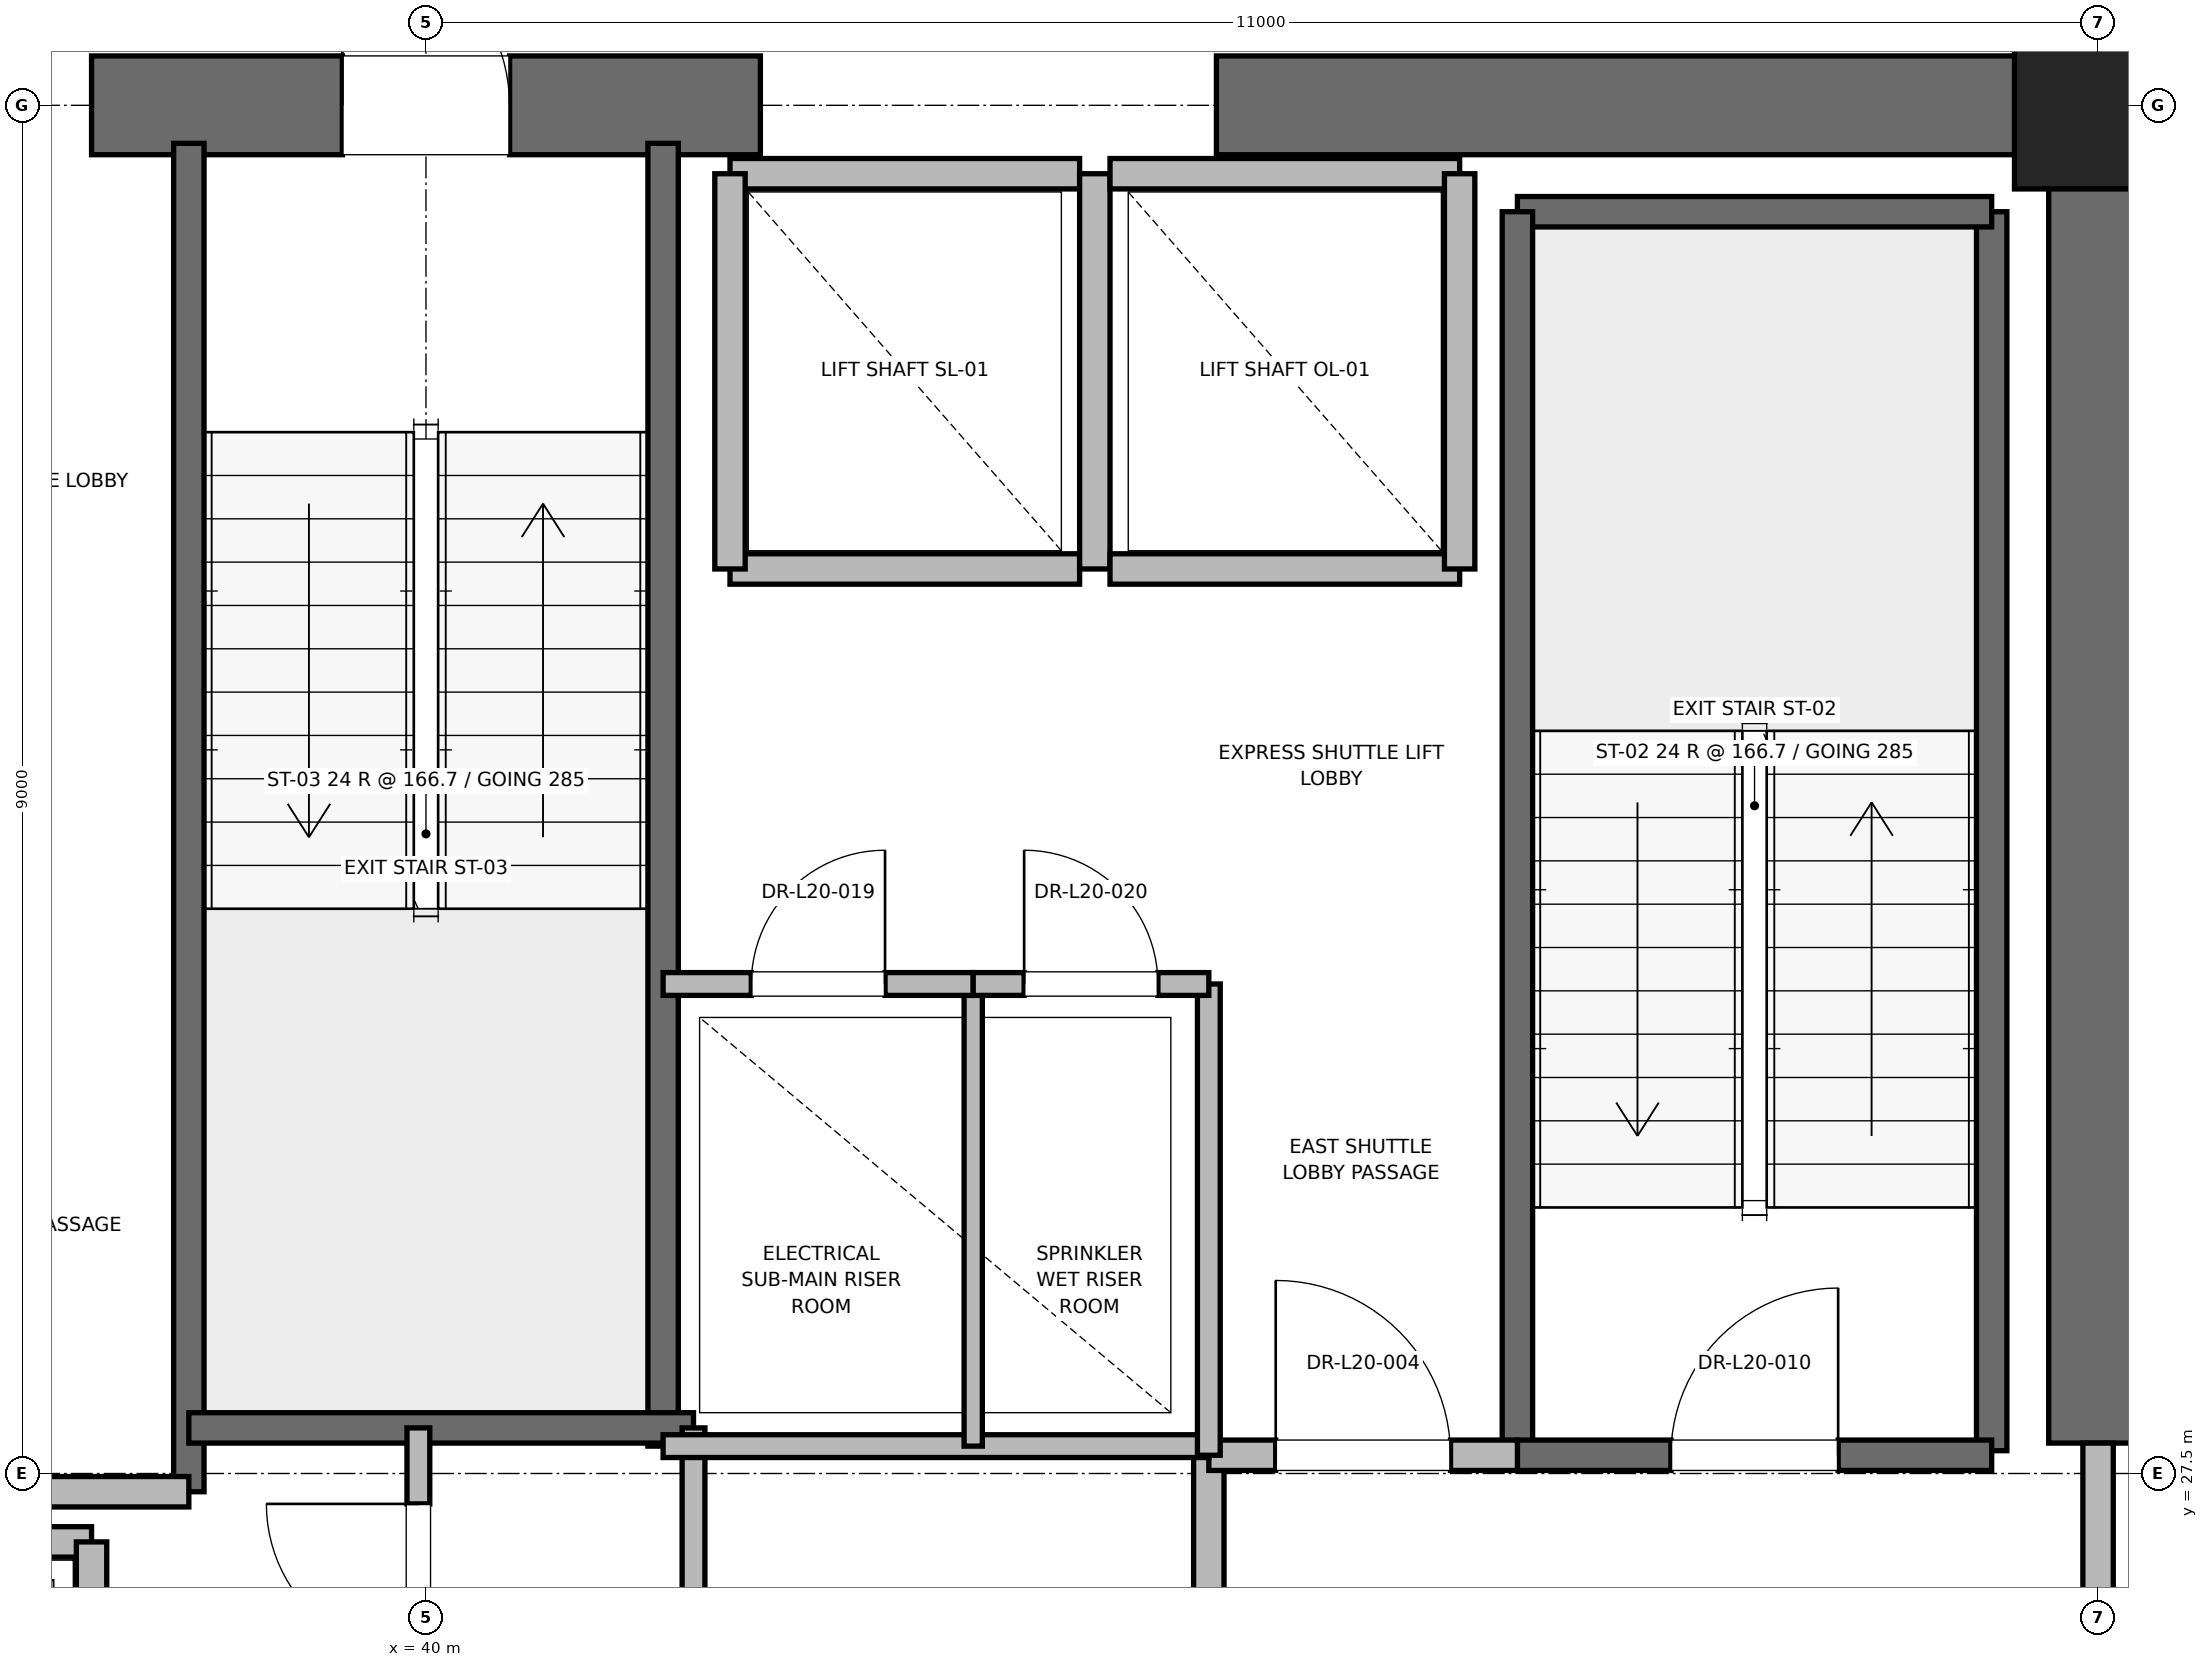
"""IFC4 building model, lengths in metres.
Left out: names, types, materials, properties, quantities, classifications, styles, units other than length and angle.
Written with IfcOpenShell. Run it as: python <this file> out.ifc"""

import sys

from ifc_helpers import new_model, si_unit, direction, frame, frame_2d, origin, origin_2d, place, context, subcontext, project, spatial, rectangle, extrude, element, fill, save


model = new_model("IFC4")
c1 = context("Model", 3, precision=1e-05, world=origin(), true_north=direction((0.0, 1.0)))
c2 = subcontext(c1, "Body", "Model", "MODEL_VIEW")
j1 = project(units=[si_unit("LENGTHUNIT", "METRE"), si_unit("PLANEANGLEUNIT", "RADIAN")], contexts=[c1])
p1 = place(None, origin())
s1 = spatial("IfcSite", under=j1, at=p1, CompositionType="ELEMENT")
p2 = place(p1, origin())
s2 = spatial("IfcBuilding", under=s1, at=p2, CompositionType="ELEMENT")
p3 = place(p2, frame((0.0, 0.0, 87.6)))
s3 = spatial("IfcBuildingStorey", under=s2, at=p3, CompositionType="ELEMENT", Elevation=87.6)
p4 = place(p3, frame((51.0, 36.5, 0.0), z_axis=(0.0, 0.0, 1.0), x_axis=(1.0, 0.0, 0.0)))
e1 = element("IfcColumn", 1, at=p4, inside=s3, PredefinedType="PILASTER", context=c2, shape_type="SweptSolid", body=[
    extrude(rectangle(XDim=1.1, YDim=1.1, at=origin_2d()), origin(), (0.0, 0.0, 1.0), 4.0),
])
p5 = place(p3, frame((37.8, 36.5, 0.0), z_axis=(0.0, 0.0, 1.0), x_axis=(1.0, 0.0, 0.0)))
e2 = element("IfcWall", 2, at=p5, inside=s3, PredefinedType="SHEAR", context=c2, shape_type="SweptSolid", body=[
    extrude(rectangle(XDim=4.4, YDim=0.65, at=frame_2d((2.2, 0.0))), origin(), (0.0, 0.0, 1.0), 3.76),
])
p6 = place(p5, frame((1.65, 0.0, 0.0)))
e3 = element("IfcOpeningElement", 3, at=p6, cuts=e2, PredefinedType="OPENING", context=c2, shape_type="SweptSolid", body=[
    extrude(rectangle(XDim=1.1, YDim=2.15, at=frame_2d((0.55, 1.075))), frame((0.0, 0.325, 0.0), z_axis=(0.0, -1.0, 0.0), x_axis=(1.0, 0.0, 0.0)), (0.0, 0.0, 1.0), 0.65),
])
p7 = place(p3, frame((45.2, 36.5, 0.0), z_axis=(0.0, 0.0, 1.0), x_axis=(1.0, 0.0, 0.0)))
e4 = element("IfcWall", 4, at=p7, inside=s3, PredefinedType="SHEAR", context=c2, shape_type="SweptSolid", body=[
    extrude(rectangle(XDim=5.8, YDim=0.65, at=frame_2d((2.9, 0.0))), origin(), (0.0, 0.0, 1.0), 3.76),
])
p8 = place(p3, frame((51.0, 27.7, 0.0), z_axis=(0.0, 0.0, 1.0), x_axis=(0.0, 1.0, 0.0)))
e5 = element("IfcWall", 5, at=p8, inside=s3, PredefinedType="SHEAR", context=c2, shape_type="SweptSolid", body=[
    extrude(rectangle(XDim=8.8, YDim=0.65, at=frame_2d((4.4, 0.0))), origin(), (0.0, 0.0, 1.0), 3.76),
])
p9 = place(p3, frame((50.3, 27.65, 0.0), z_axis=(0.0, 0.0, 1.0), x_axis=(0.0, 1.0, 0.0)))
e6 = element("IfcWall", 6, at=p9, inside=s3, PredefinedType="SOLIDWALL", context=c2, shape_type="SweptSolid", body=[
    extrude(rectangle(XDim=8.15, YDim=0.2, at=frame_2d((4.075, 0.0))), origin(), (0.0, 0.0, 1.0), 3.76),
])
p10 = place(p3, frame((47.18, 35.8, 0.0), z_axis=(0.0, 0.0, 1.0), x_axis=(1.0, 0.0, 0.0)))
e7 = element("IfcWall", 7, at=p10, inside=s3, PredefinedType="SOLIDWALL", context=c2, shape_type="SweptSolid", body=[
    extrude(rectangle(XDim=3.12, YDim=0.2, at=frame_2d((1.56, 0.0))), origin(), (0.0, 0.0, 1.0), 3.76),
])
p11 = place(p3, frame((47.18, 27.62, 0.0), z_axis=(0.0, 0.0, 1.0), x_axis=(0.0, 1.0, 0.0)))
e8 = element("IfcWall", 8, at=p11, inside=s3, PredefinedType="SOLIDWALL", context=c2, shape_type="SweptSolid", body=[
    extrude(rectangle(XDim=8.18, YDim=0.2, at=frame_2d((4.09, 0.0))), origin(), (0.0, 0.0, 1.0), 3.76),
])
p12 = place(p3, frame((47.18, 27.62, 0.0), z_axis=(0.0, 0.0, 1.0), x_axis=(1.0, 0.0, 0.0)))
e9 = element("IfcWall", 9, at=p12, inside=s3, PredefinedType="SOLIDWALL", context=c2, shape_type="SweptSolid", body=[
    extrude(rectangle(XDim=3.12, YDim=0.2, at=frame_2d((1.56, 0.0))), origin(), (0.0, 0.0, 1.0), 3.76),
])
p13 = place(p12, frame((1.01, 0.0, 0.0)))
e10 = element("IfcOpeningElement", 10, at=p13, cuts=e9, PredefinedType="OPENING", context=c2, shape_type="SweptSolid", body=[
    extrude(rectangle(XDim=1.1, YDim=2.15, at=frame_2d((0.55, 1.075))), frame((0.0, 0.1, 0.0), z_axis=(0.0, -1.0, 0.0), x_axis=(1.0, 0.0, 0.0)), (0.0, 0.0, 1.0), 0.2),
])
p14 = place(p3, frame((38.44, 27.38, 0.0), z_axis=(0.0, 0.0, 1.0), x_axis=(0.0, 1.0, 0.0)))
e11 = element("IfcWall", 11, at=p14, inside=s3, PredefinedType="SOLIDWALL", context=c2, shape_type="SweptSolid", body=[
    extrude(rectangle(XDim=8.87, YDim=0.2, at=frame_2d((4.435, 0.0))), origin(), (0.0, 0.0, 1.0), 3.76),
])
p15 = place(p3, frame((41.56, 27.68, 0.0), z_axis=(0.0, 0.0, 1.0), x_axis=(0.0, 1.0, 0.0)))
e12 = element("IfcWall", 12, at=p15, inside=s3, PredefinedType="SOLIDWALL", context=c2, shape_type="SweptSolid", body=[
    extrude(rectangle(XDim=8.57, YDim=0.2, at=frame_2d((4.285, 0.0))), origin(), (0.0, 0.0, 1.0), 3.76),
])
p16 = place(p3, frame((38.44, 27.8, 0.0), z_axis=(0.0, 0.0, 1.0), x_axis=(1.0, 0.0, 0.0)))
e13 = element("IfcWall", 13, at=p16, inside=s3, PredefinedType="SOLIDWALL", context=c2, shape_type="SweptSolid", body=[
    extrude(rectangle(XDim=3.32, YDim=0.2, at=frame_2d((1.66, 0.0))), origin(), (0.0, 0.0, 1.0), 3.76),
])
p17 = place(p3, frame((32.82, 27.38, 0.0), z_axis=(0.0, 0.0, 1.0), x_axis=(1.0, 0.0, 0.0)))
e14 = element("IfcWall", 14, at=p17, inside=s3, PredefinedType="PARTITIONING", context=c2, shape_type="SweptSolid", body=[
    extrude(rectangle(XDim=5.62, YDim=0.2, at=frame_2d((2.81, 0.0))), origin(), (0.0, 0.0, 1.0), 3.76),
])
p18 = place(p3, frame((45.15, 24.25, 0.0), z_axis=(0.0, 0.0, 1.0), x_axis=(0.0, 1.0, 0.0)))
e15 = element("IfcWall", 15, at=p18, inside=s3, PredefinedType="PARTITIONING", context=c2, shape_type="SweptSolid", body=[
    extrude(rectangle(XDim=3.37, YDim=0.2, at=frame_2d((1.685, 0.0))), origin(), (0.0, 0.0, 1.0), 3.76),
])
p19 = place(p3, frame((45.15, 27.62, 0.0), z_axis=(0.0, 0.0, 1.0), x_axis=(1.0, 0.0, 0.0)))
e16 = element("IfcWall", 16, at=p19, inside=s3, PredefinedType="PARTITIONING", context=c2, shape_type="SweptSolid", body=[
    extrude(rectangle(XDim=2.03, YDim=0.2, at=frame_2d((1.015, 0.0))), origin(), (0.0, 0.0, 1.0), 3.76),
])
p20 = place(p19, frame((0.44, 0.0, 0.0)))
e17 = element("IfcOpeningElement", 17, at=p20, cuts=e16, PredefinedType="OPENING", context=c2, shape_type="SweptSolid", body=[
    extrude(rectangle(XDim=1.15, YDim=2.2, at=frame_2d((0.575, 1.1))), frame((0.0, 0.1, 0.0), z_axis=(0.0, -1.0, 0.0), x_axis=(1.0, 0.0, 0.0)), (0.0, 0.0, 1.0), 0.2),
])
p21 = place(p3, frame((51.0, 24.3, 0.0), z_axis=(0.0, 0.0, 1.0), x_axis=(0.0, 1.0, 0.0)))
e18 = element("IfcWall", 18, at=p21, inside=s3, PredefinedType="PARTITIONING", context=c2, shape_type="SweptSolid", body=[
    extrude(rectangle(XDim=3.4, YDim=0.2, at=frame_2d((1.7, 0.0))), origin(), (0.0, 0.0, 1.0), 2.54),
])
p22 = place(p21, frame((1.125, 0.0, 0.0)))
e19 = element("IfcOpeningElement", 19, at=p22, cuts=e18, PredefinedType="OPENING", context=c2, shape_type="SweptSolid", body=[
    extrude(rectangle(XDim=1.15, YDim=2.2, at=frame_2d((0.575, 1.1))), frame((0.0, 0.1, 0.0), z_axis=(0.0, -1.0, 0.0), x_axis=(1.0, 0.0, 0.0)), (0.0, 0.0, 1.0), 0.2),
])
p23 = place(p3, frame((37.8, 27.05, 0.0), z_axis=(0.0, 0.0, 1.0), x_axis=(-1.0, 0.0, 0.0)))
e20 = element("IfcWall", 20, at=p23, inside=s3, PredefinedType="SOLIDWALL", context=c2, shape_type="SweptSolid", body=[
    extrude(rectangle(XDim=2.3, YDim=0.2, at=frame_2d((1.15, 0.0))), origin(), (0.0, 0.0, 1.0), 3.76),
])
p24 = place(p3, frame((37.8, 24.45, 0.0), z_axis=(0.0, 0.0, 1.0), x_axis=(0.0, 1.0, 0.0)))
e21 = element("IfcWall", 21, at=p24, inside=s3, PredefinedType="SOLIDWALL", context=c2, shape_type="SweptSolid", body=[
    extrude(rectangle(XDim=2.6, YDim=0.2, at=frame_2d((1.3, 0.0))), origin(), (0.0, 0.0, 1.0), 3.76),
])
p25 = place(p3, frame((42.0, 33.45, 0.0), z_axis=(0.0, 0.0, 1.0), x_axis=(1.0, 0.0, 0.0)))
e22 = element("IfcWall", 22, at=p25, inside=s3, PredefinedType="SOLIDWALL", context=c2, shape_type="SweptSolid", body=[
    extrude(rectangle(XDim=2.3, YDim=0.2, at=frame_2d((1.15, 0.0))), origin(), (0.0, 0.0, 1.0), 3.76),
])
p26 = place(p3, frame((44.3, 36.05, 0.0), z_axis=(0.0, 0.0, 1.0), x_axis=(-1.0, 0.0, 0.0)))
e23 = element("IfcWall", 23, at=p26, inside=s3, PredefinedType="SOLIDWALL", context=c2, shape_type="SweptSolid", body=[
    extrude(rectangle(XDim=2.3, YDim=0.2, at=frame_2d((1.15, 0.0))), origin(), (0.0, 0.0, 1.0), 2.54),
])
for number, where, z_axis, x_axis in (
    (24, (42.0, 36.05, 0.0), (0.0, 0.0, 1.0), (0.0, -1.0, 0.0)),
    (25, (44.4, 33.45, 0.0), (0.0, 0.0, 1.0), (0.0, 1.0, 0.0)),
):
    element("IfcWall", number, at=place(p3, frame(where, z_axis=z_axis, x_axis=x_axis)), inside=s3, PredefinedType="SOLIDWALL", context=c2, shape_type="SweptSolid", body=[
        extrude(rectangle(XDim=2.6, YDim=0.2, at=frame_2d((1.3, 0.0))), origin(), (0.0, 0.0, 1.0), 2.54),
    ])
p27 = place(p3, frame((44.5, 33.45, 0.0), z_axis=(0.0, 0.0, 1.0), x_axis=(1.0, 0.0, 0.0)))
e26 = element("IfcWall", 26, at=p27, inside=s3, PredefinedType="SOLIDWALL", context=c2, shape_type="SweptSolid", body=[
    extrude(rectangle(XDim=2.3, YDim=0.2, at=frame_2d((1.15, 0.0))), origin(), (0.0, 0.0, 1.0), 3.76),
])
p28 = place(p3, frame((46.8, 36.05, 0.0), z_axis=(0.0, 0.0, 1.0), x_axis=(-1.0, 0.0, 0.0)))
e27 = element("IfcWall", 27, at=p28, inside=s3, PredefinedType="SOLIDWALL", context=c2, shape_type="SweptSolid", body=[
    extrude(rectangle(XDim=2.3, YDim=0.2, at=frame_2d((1.15, 0.0))), origin(), (0.0, 0.0, 1.0), 2.54),
])
p29 = place(p3, frame((46.8, 33.45, 0.0), z_axis=(0.0, 0.0, 1.0), x_axis=(0.0, 1.0, 0.0)))
e28 = element("IfcWall", 28, at=p29, inside=s3, PredefinedType="SOLIDWALL", context=c2, shape_type="SweptSolid", body=[
    extrude(rectangle(XDim=2.6, YDim=0.2, at=frame_2d((1.3, 0.0))), origin(), (0.0, 0.0, 1.0), 3.76),
])
p30 = place(p3, frame((41.76, 23.8, 0.0), z_axis=(0.0, 0.0, 1.0), x_axis=(0.0, 1.0, 0.0)))
e29 = element("IfcWall", 29, at=p30, inside=s3, PredefinedType="PARTITIONING", context=c2, shape_type="SweptSolid", body=[
    extrude(rectangle(XDim=4.0, YDim=0.15, at=frame_2d((2.0, 0.0))), origin(), (0.0, 0.0, 1.0), 2.85),
])
p31 = place(p3, frame((39.95, 25.8, 0.0), z_axis=(0.0, 0.0, 1.0), x_axis=(0.0, 1.0, 0.0)))
e30 = element("IfcWall", 30, at=p31, inside=s3, PredefinedType="PARTITIONING", context=c2, shape_type="SweptSolid", body=[
    extrude(rectangle(XDim=2.0, YDim=0.15, at=frame_2d((1.0, 0.0))), origin(), (0.0, 0.0, 1.0), 2.85),
])
p32 = place(p31, frame((0.5, 0.0, 0.0)))
e31 = element("IfcOpeningElement", 31, at=p32, cuts=e30, PredefinedType="OPENING", context=c2, shape_type="SweptSolid", body=[
    extrude(rectangle(XDim=1.0, YDim=2.15, at=frame_2d((0.5, 1.075))), frame((0.0, 0.075, 0.0), z_axis=(0.0, -1.0, 0.0), x_axis=(1.0, 0.0, 0.0)), (0.0, 0.0, 1.0), 0.15),
])
p33 = place(p3, frame((41.56, 27.68, 0.0), z_axis=(0.0, 0.0, 1.0), x_axis=(1.0, 0.0, 0.0)))
e32 = element("IfcWall", 32, at=p33, inside=s3, PredefinedType="PARTITIONING", context=c2, shape_type="SweptSolid", body=[
    extrude(rectangle(XDim=3.59, YDim=0.15, at=frame_2d((1.795, 0.0))), origin(), (0.0, 0.0, 1.0), 2.85),
])
p34 = place(p3, frame((45.15, 27.62, 0.0), z_axis=(0.0, 0.0, 1.0), x_axis=(0.0, 1.0, 0.0)))
e33 = element("IfcWall", 33, at=p34, inside=s3, PredefinedType="PARTITIONING", context=c2, shape_type="SweptSolid", body=[
    extrude(rectangle(XDim=3.1, YDim=0.15, at=frame_2d((1.55, 0.0))), origin(), (0.0, 0.0, 1.0), 2.85),
])
p35 = place(p3, frame((43.6, 27.68, 0.0), z_axis=(0.0, 0.0, 1.0), x_axis=(0.0, 1.0, 0.0)))
e34 = element("IfcWall", 34, at=p35, inside=s3, PredefinedType="PARTITIONING", context=c2, shape_type="SweptSolid", body=[
    extrude(rectangle(XDim=3.04, YDim=0.12, at=frame_2d((1.52, 0.0))), origin(), (0.0, 0.0, 1.0), 2.85),
])
p36 = place(p3, frame((41.56, 30.72, 0.0), z_axis=(0.0, 0.0, 1.0), x_axis=(1.0, 0.0, 0.0)))
e35 = element("IfcWall", 35, at=p36, inside=s3, PredefinedType="PARTITIONING", context=c2, shape_type="SweptSolid", body=[
    extrude(rectangle(XDim=2.04, YDim=0.15, at=frame_2d((1.02, 0.0))), origin(), (0.0, 0.0, 1.0), 2.85),
])
p37 = place(p36, frame((0.58, 0.0, 0.0)))
e36 = element("IfcOpeningElement", 36, at=p37, cuts=e35, PredefinedType="OPENING", context=c2, shape_type="SweptSolid", body=[
    extrude(rectangle(XDim=0.88, YDim=2.1, at=frame_2d((0.44, 1.05))), frame((0.0, 0.075, 0.0), z_axis=(0.0, -1.0, 0.0), x_axis=(1.0, 0.0, 0.0)), (0.0, 0.0, 1.0), 0.15),
])
p38 = place(p3, frame((43.6, 30.72, 0.0), z_axis=(0.0, 0.0, 1.0), x_axis=(1.0, 0.0, 0.0)))
e37 = element("IfcWall", 37, at=p38, inside=s3, PredefinedType="PARTITIONING", context=c2, shape_type="SweptSolid", body=[
    extrude(rectangle(XDim=1.55, YDim=0.15, at=frame_2d((0.775, 0.0))), origin(), (0.0, 0.0, 1.0), 2.85),
])
p39 = place(p38, frame((0.335, 0.0, 0.0)))
e38 = element("IfcOpeningElement", 38, at=p39, cuts=e37, PredefinedType="OPENING", context=c2, shape_type="SweptSolid", body=[
    extrude(rectangle(XDim=0.88, YDim=2.1, at=frame_2d((0.44, 1.05))), frame((0.0, 0.075, 0.0), z_axis=(0.0, -1.0, 0.0), x_axis=(1.0, 0.0, 0.0)), (0.0, 0.0, 1.0), 0.15),
])
p40 = place(p13, origin())
e39 = element("IfcDoor", 39, at=p40, inside=s3, OperationType="SINGLE_SWING_RIGHT", PredefinedType="DOOR", context=c2, shape_type="SweptSolid", body=[
    extrude(rectangle(XDim=1.1, YDim=2.15, at=frame_2d((0.55, 1.075))), frame((0.0, 0.025, 0.0), z_axis=(0.0, -1.0, 0.0), x_axis=(1.0, 0.0, 0.0)), (0.0, 0.0, 1.0), 0.05),
])
fill(e10, e39)
p41 = place(p6, origin())
e40 = element("IfcDoor", 40, at=p41, inside=s3, OperationType="SINGLE_SWING_LEFT", PredefinedType="DOOR", context=c2, shape_type="SweptSolid", body=[
    extrude(rectangle(XDim=1.1, YDim=2.15, at=frame_2d((0.55, 1.075))), frame((0.0, 0.025, 0.0), z_axis=(0.0, -1.0, 0.0), x_axis=(1.0, 0.0, 0.0)), (0.0, 0.0, 1.0), 0.05),
])
fill(e3, e40)
p42 = place(p20, origin())
e41 = element("IfcDoor", 41, at=p42, inside=s3, OperationType="SINGLE_SWING_LEFT", PredefinedType="DOOR", context=c2, shape_type="SweptSolid", body=[
    extrude(rectangle(XDim=1.15, YDim=2.2, at=frame_2d((0.575, 1.1))), frame((0.0, 0.025, 0.0), z_axis=(0.0, -1.0, 0.0), x_axis=(1.0, 0.0, 0.0)), (0.0, 0.0, 1.0), 0.05),
])
fill(e17, e41)
p43 = place(p32, origin())
e42 = element("IfcDoor", 42, at=p43, inside=s3, OperationType="SINGLE_SWING_RIGHT", PredefinedType="DOOR", context=c2, shape_type="SweptSolid", body=[
    extrude(rectangle(XDim=1.0, YDim=2.15, at=frame_2d((0.5, 1.075))), frame((0.0, 0.025, 0.0), z_axis=(0.0, -1.0, 0.0), x_axis=(1.0, 0.0, 0.0)), (0.0, 0.0, 1.0), 0.05),
])
fill(e31, e42)
p44 = place(p37, origin())
e43 = element("IfcDoor", 43, at=p44, inside=s3, OperationType="SINGLE_SWING_RIGHT", PredefinedType="DOOR", context=c2, shape_type="SweptSolid", body=[
    extrude(rectangle(XDim=0.88, YDim=2.1, at=frame_2d((0.44, 1.05))), frame((0.0, 0.025, 0.0), z_axis=(0.0, -1.0, 0.0), x_axis=(1.0, 0.0, 0.0)), (0.0, 0.0, 1.0), 0.05),
])
fill(e36, e43)
p45 = place(p39, origin())
e44 = element("IfcDoor", 44, at=p45, inside=s3, OperationType="SINGLE_SWING_LEFT", PredefinedType="DOOR", context=c2, shape_type="SweptSolid", body=[
    extrude(rectangle(XDim=0.88, YDim=2.1, at=frame_2d((0.44, 1.05))), frame((0.0, 0.025, 0.0), z_axis=(0.0, -1.0, 0.0), x_axis=(1.0, 0.0, 0.0)), (0.0, 0.0, 1.0), 0.05),
])
fill(e38, e44)
save(model, sys.argv[1])
